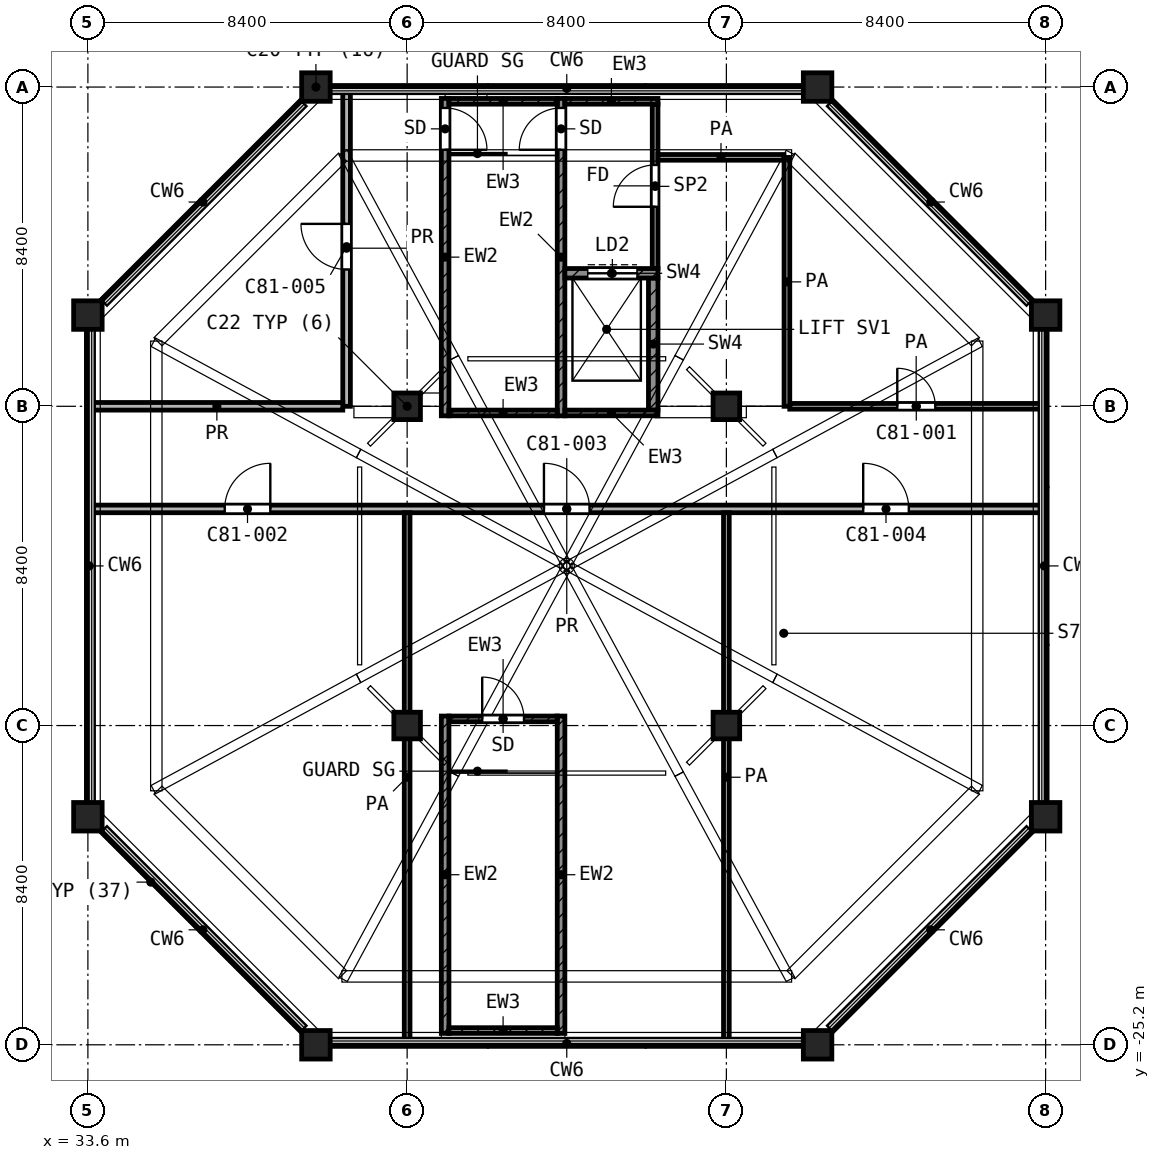
"""IFC4 building model, lengths in metres.
Left out: names, types, materials, properties, quantities, classifications, styles, units other than length and angle.
Written with IfcOpenShell. Run it as: python <this file> out.ifc"""

import sys

from ifc_helpers import new_model, si_unit, direction, frame, frame_2d, origin, origin_2d, place, context, subcontext, project, spatial, rectangle, extrude, element, fill, save


model = new_model("IFC4")
c1 = context("Model", 3, precision=1e-05, world=origin(), true_north=direction((0.0, 1.0)))
c2 = subcontext(c1, "Body", "Model", "MODEL_VIEW")
j1 = project(units=[si_unit("LENGTHUNIT", "METRE"), si_unit("PLANEANGLEUNIT", "RADIAN")], contexts=[c1])
p1 = place(None, origin())
s1 = spatial("IfcSite", under=j1, at=p1, CompositionType="ELEMENT")
p2 = place(p1, origin())
s2 = spatial("IfcBuilding", under=s1, at=p2, CompositionType="ELEMENT")
p3 = place(p2, frame((0.0, 0.0, 350.2)))
s3 = spatial("IfcBuildingStorey", under=s2, at=p3, CompositionType="ELEMENT", Elevation=350.2)
for number, where, z_axis, x_axis in (
    (1, (39.6, 0.0, 0.0), (0.0, 0.0, 1.0), (1.0, 0.0, 0.0)),
    (2, (52.8, 0.0, 0.0), (0.0, 0.0, 1.0), (1.0, 0.0, 0.0)),
    (3, (33.6, -6.0, 0.0), (0.0, 0.0, 1.0), (1.0, 0.0, 0.0)),
    (4, (58.8, -6.0, 0.0), (0.0, 0.0, 1.0), (1.0, 0.0, 0.0)),
):
    element("IfcColumn", number, at=place(p3, frame(where, z_axis=z_axis, x_axis=x_axis)), inside=s3, PredefinedType="COLUMN", context=c2, shape_type="SweptSolid", body=[
        extrude(rectangle(XDim=0.75, YDim=0.75, at=origin_2d()), origin(), (0.0, 0.0, 1.0), 4.5),
    ])
for number, where, z_axis, x_axis in (
    (5, (42.0, -8.4, 0.0), (0.0, 0.0, 1.0), (1.0, 0.0, 0.0)),
    (6, (50.4, -8.4, 0.0), (0.0, 0.0, 1.0), (1.0, 0.0, 0.0)),
    (7, (42.0, -16.8, 0.0), (0.0, 0.0, 1.0), (1.0, 0.0, 0.0)),
    (8, (50.4, -16.8, 0.0), (0.0, 0.0, 1.0), (1.0, 0.0, 0.0)),
):
    element("IfcColumn", number, at=place(p3, frame(where, z_axis=z_axis, x_axis=x_axis)), inside=s3, PredefinedType="COLUMN", context=c2, shape_type="SweptSolid", body=[
        extrude(rectangle(XDim=0.7, YDim=0.7, at=origin_2d()), origin(), (0.0, 0.0, 1.0), 4.5),
    ])
for number, where, z_axis, x_axis in (
    (9, (33.6, -19.2, 0.0), (0.0, 0.0, 1.0), (1.0, 0.0, 0.0)),
    (10, (58.8, -19.2, 0.0), (0.0, 0.0, 1.0), (1.0, 0.0, 0.0)),
    (11, (39.6, -25.2, 0.0), (0.0, 0.0, 1.0), (1.0, 0.0, 0.0)),
    (12, (52.8, -25.2, 0.0), (0.0, 0.0, 1.0), (1.0, 0.0, 0.0)),
):
    element("IfcColumn", number, at=place(p3, frame(where, z_axis=z_axis, x_axis=x_axis)), inside=s3, PredefinedType="COLUMN", context=c2, shape_type="SweptSolid", body=[
        extrude(rectangle(XDim=0.75, YDim=0.75, at=origin_2d()), origin(), (0.0, 0.0, 1.0), 4.5),
    ])
p4 = place(p3, frame((39.6, -25.075, 4.5), z_axis=(0.0, 0.0, 1.0), x_axis=(1.0, 0.0, 0.0)))
e13 = element("IfcWall", 13, at=p4, inside=s3, PredefinedType="SOLIDWALL", context=c2, shape_type="SweptSolid", body=[
    extrude(rectangle(XDim=13.2, YDim=0.25, at=frame_2d((6.6, 0.0))), origin(), (0.0, 0.0, 1.0), 1.1),
])
p5 = place(p3, frame((52.785, -25.038, 4.5), z_axis=(0.0, 0.0, 1.0), x_axis=(0.707106781187, 0.707106781187, 0.0)))
e14 = element("IfcWall", 14, at=p5, inside=s3, PredefinedType="SOLIDWALL", context=c2, shape_type="SweptSolid", body=[
    extrude(rectangle(XDim=8.278, YDim=0.25, at=frame_2d((4.139, 0.0))), origin(), (0.0, 0.0, 1.0), 1.1),
])
p6 = place(p3, frame((58.675, -19.2, 4.5), z_axis=(0.0, 0.0, 1.0), x_axis=(0.0, 1.0, 0.0)))
e15 = element("IfcWall", 15, at=p6, inside=s3, PredefinedType="SOLIDWALL", context=c2, shape_type="SweptSolid", body=[
    extrude(rectangle(XDim=13.2, YDim=0.25, at=frame_2d((6.6, 0.0))), origin(), (0.0, 0.0, 1.0), 1.1),
])
p7 = place(p3, frame((58.638, -6.015, 4.5), z_axis=(0.0, 0.0, 1.0), x_axis=(-0.707106781187, 0.707106781187, 0.0)))
e16 = element("IfcWall", 16, at=p7, inside=s3, PredefinedType="SOLIDWALL", context=c2, shape_type="SweptSolid", body=[
    extrude(rectangle(XDim=8.278, YDim=0.25, at=frame_2d((4.139, 0.0))), origin(), (0.0, 0.0, 1.0), 1.1),
])
p8 = place(p3, frame((52.8, -0.125, 4.5), z_axis=(0.0, 0.0, 1.0), x_axis=(-1.0, 0.0, 0.0)))
e17 = element("IfcWall", 17, at=p8, inside=s3, PredefinedType="SOLIDWALL", context=c2, shape_type="SweptSolid", body=[
    extrude(rectangle(XDim=13.2, YDim=0.25, at=frame_2d((6.6, 0.0))), origin(), (0.0, 0.0, 1.0), 1.1),
])
p9 = place(p3, frame((39.615, -0.162, 4.5), z_axis=(0.0, 0.0, 1.0), x_axis=(-0.707106781187, -0.707106781187, 0.0)))
e18 = element("IfcWall", 18, at=p9, inside=s3, PredefinedType="SOLIDWALL", context=c2, shape_type="SweptSolid", body=[
    extrude(rectangle(XDim=8.278, YDim=0.25, at=frame_2d((4.139, 0.0))), origin(), (0.0, 0.0, 1.0), 1.1),
])
p10 = place(p3, frame((33.725, -6.0, 4.5), z_axis=(0.0, 0.0, 1.0), x_axis=(0.0, -1.0, 0.0)))
e19 = element("IfcWall", 19, at=p10, inside=s3, PredefinedType="SOLIDWALL", context=c2, shape_type="SweptSolid", body=[
    extrude(rectangle(XDim=13.2, YDim=0.25, at=frame_2d((6.6, 0.0))), origin(), (0.0, 0.0, 1.0), 1.1),
])
p11 = place(p3, frame((33.762, -19.185, 4.5), z_axis=(0.0, 0.0, 1.0), x_axis=(0.707106781187, -0.707106781187, 0.0)))
e20 = element("IfcWall", 20, at=p11, inside=s3, PredefinedType="SOLIDWALL", context=c2, shape_type="SweptSolid", body=[
    extrude(rectangle(XDim=8.278, YDim=0.25, at=frame_2d((4.139, 0.0))), origin(), (0.0, 0.0, 1.0), 1.1),
])
p12 = place(p3, frame((43.0, -8.65, 0.0), z_axis=(0.0, 0.0, 1.0), x_axis=(0.0, 1.0, 0.0)))
e21 = element("IfcWall", 21, at=p12, inside=s3, PredefinedType="SHEAR", context=c2, shape_type="SweptSolid", body=[
    extrude(rectangle(XDim=8.35, YDim=0.2, at=frame_2d((4.175, 0.0))), origin(), (0.0, 0.0, 1.0), 4.2),
])
p13 = place(p12, frame((7.0, 0.0, 0.0)))
e22 = element("IfcOpeningElement", 22, at=p13, cuts=e21, PredefinedType="OPENING", context=c2, shape_type="SweptSolid", body=[
    extrude(rectangle(XDim=1.1, YDim=2.1, at=frame_2d((0.55, 1.05))), frame((0.0, 0.11, 0.0), z_axis=(0.0, -1.0, 0.0), x_axis=(1.0, 0.0, 0.0)), (0.0, 0.0, 1.0), 0.22),
])
p14 = place(p3, frame((46.05, -8.65, 0.0), z_axis=(0.0, 0.0, 1.0), x_axis=(0.0, 1.0, 0.0)))
e23 = element("IfcWall", 23, at=p14, inside=s3, PredefinedType="SHEAR", context=c2, shape_type="SweptSolid", body=[
    extrude(rectangle(XDim=8.35, YDim=0.2, at=frame_2d((4.175, 0.0))), origin(), (0.0, 0.0, 1.0), 4.2),
])
p15 = place(p14, frame((7.0, 0.0, 0.0)))
e24 = element("IfcOpeningElement", 24, at=p15, cuts=e23, PredefinedType="OPENING", context=c2, shape_type="SweptSolid", body=[
    extrude(rectangle(XDim=1.1, YDim=2.1, at=frame_2d((0.55, 1.05))), frame((0.0, 0.11, 0.0), z_axis=(0.0, -1.0, 0.0), x_axis=(1.0, 0.0, 0.0)), (0.0, 0.0, 1.0), 0.22),
])
p16 = place(p3, frame((43.1, -0.375, 0.0), z_axis=(0.0, 0.0, 1.0), x_axis=(1.0, 0.0, 0.0)))
e25 = element("IfcWall", 25, at=p16, inside=s3, PredefinedType="SHEAR", context=c2, shape_type="SweptSolid", body=[
    extrude(rectangle(XDim=2.85, YDim=0.15, at=frame_2d((1.425, 0.0))), origin(), (0.0, 0.0, 1.0), 4.2),
])
p17 = place(p3, frame((46.15, -0.375, 0.0), z_axis=(0.0, 0.0, 1.0), x_axis=(1.0, 0.0, 0.0)))
e26 = element("IfcWall", 26, at=p17, inside=s3, PredefinedType="SHEAR", context=c2, shape_type="SweptSolid", body=[
    extrude(rectangle(XDim=2.45, YDim=0.15, at=frame_2d((1.225, 0.0))), origin(), (0.0, 0.0, 1.0), 4.2),
])
p18 = place(p3, frame((43.1, -8.575, 0.0), z_axis=(0.0, 0.0, 1.0), x_axis=(1.0, 0.0, 0.0)))
e27 = element("IfcWall", 27, at=p18, inside=s3, PredefinedType="SHEAR", context=c2, shape_type="SweptSolid", body=[
    extrude(rectangle(XDim=2.85, YDim=0.15, at=frame_2d((1.425, 0.0))), origin(), (0.0, 0.0, 1.0), 4.2),
])
p19 = place(p3, frame((46.15, -8.575, 0.0), z_axis=(0.0, 0.0, 1.0), x_axis=(1.0, 0.0, 0.0)))
e28 = element("IfcWall", 28, at=p19, inside=s3, PredefinedType="SHEAR", context=c2, shape_type="SweptSolid", body=[
    extrude(rectangle(XDim=2.45, YDim=0.15, at=frame_2d((1.225, 0.0))), origin(), (0.0, 0.0, 1.0), 4.2),
])
p20 = place(p3, frame((46.15, -4.9, 0.0), z_axis=(0.0, 0.0, 1.0), x_axis=(1.0, 0.0, 0.0)))
e29 = element("IfcWall", 29, at=p20, inside=s3, PredefinedType="SHEAR", context=c2, shape_type="SweptSolid", body=[
    extrude(rectangle(XDim=2.45, YDim=0.25, at=frame_2d((1.225, 0.0))), origin(), (0.0, 0.0, 1.0), 4.2),
])
p21 = place(p20, frame((0.6, 0.0, 0.0)))
e30 = element("IfcOpeningElement", 30, at=p21, cuts=e29, PredefinedType="OPENING", context=c2, shape_type="SweptSolid", body=[
    extrude(rectangle(XDim=1.3, YDim=2.1, at=frame_2d((0.65, 1.05))), frame((0.0, 0.135, 0.0), z_axis=(0.0, -1.0, 0.0), x_axis=(1.0, 0.0, 0.0)), (0.0, 0.0, 1.0), 0.27),
])
p22 = place(p3, frame((48.475, -8.5, 0.0), z_axis=(0.0, 0.0, 1.0), x_axis=(0.0, 1.0, 0.0)))
e31 = element("IfcWall", 31, at=p22, inside=s3, PredefinedType="SHEAR", context=c2, shape_type="SweptSolid", body=[
    extrude(rectangle(XDim=3.475, YDim=0.25, at=frame_2d((1.738, 0.0))), origin(), (0.0, 0.0, 1.0), 4.2),
])
p23 = place(p3, frame((48.525, -4.775, 0.0), z_axis=(0.0, 0.0, 1.0), x_axis=(0.0, 1.0, 0.0)))
e32 = element("IfcWall", 32, at=p23, inside=s3, PredefinedType="PARTITIONING", context=c2, shape_type="SweptSolid", body=[
    extrude(rectangle(XDim=4.325, YDim=0.15, at=frame_2d((2.163, 0.0))), origin(), (0.0, 0.0, 1.0), 4.2),
])
p24 = place(p23, frame((1.625, 0.0, 0.0)))
e33 = element("IfcOpeningElement", 33, at=p24, cuts=e32, PredefinedType="OPENING", context=c2, shape_type="SweptSolid", body=[
    extrude(rectangle(XDim=1.1, YDim=2.1, at=frame_2d((0.55, 1.05))), frame((0.0, 0.085, 0.0), z_axis=(0.0, -1.0, 0.0), x_axis=(1.0, 0.0, 0.0)), (0.0, 0.0, 1.0), 0.17),
])
for number, where, z_axis, x_axis in (
    (34, (43.0, -24.9, 0.0), (0.0, 0.0, 1.0), (0.0, 1.0, 0.0)),
    (35, (46.05, -24.9, 0.0), (0.0, 0.0, 1.0), (0.0, 1.0, 0.0)),
):
    element("IfcWall", number, at=place(p3, frame(where, z_axis=z_axis, x_axis=x_axis)), inside=s3, PredefinedType="SHEAR", context=c2, shape_type="SweptSolid", body=[
        extrude(rectangle(XDim=8.35, YDim=0.2, at=frame_2d((4.175, 0.0))), origin(), (0.0, 0.0, 1.0), 4.2),
    ])
p25 = place(p3, frame((43.1, -16.625, 0.0), z_axis=(0.0, 0.0, 1.0), x_axis=(1.0, 0.0, 0.0)))
e36 = element("IfcWall", 36, at=p25, inside=s3, PredefinedType="SHEAR", context=c2, shape_type="SweptSolid", body=[
    extrude(rectangle(XDim=2.85, YDim=0.15, at=frame_2d((1.425, 0.0))), origin(), (0.0, 0.0, 1.0), 4.2),
])
p26 = place(p25, frame((0.875, 0.0, 0.0)))
e37 = element("IfcOpeningElement", 37, at=p26, cuts=e36, PredefinedType="OPENING", context=c2, shape_type="SweptSolid", body=[
    extrude(rectangle(XDim=1.1, YDim=2.1, at=frame_2d((0.55, 1.05))), frame((0.0, 0.085, 0.0), z_axis=(0.0, -1.0, 0.0), x_axis=(1.0, 0.0, 0.0)), (0.0, 0.0, 1.0), 0.17),
])
p27 = place(p3, frame((43.1, -24.825, 0.0), z_axis=(0.0, 0.0, 1.0), x_axis=(1.0, 0.0, 0.0)))
e38 = element("IfcWall", 38, at=p27, inside=s3, PredefinedType="SHEAR", context=c2, shape_type="SweptSolid", body=[
    extrude(rectangle(XDim=2.85, YDim=0.15, at=frame_2d((1.425, 0.0))), origin(), (0.0, 0.0, 1.0), 4.2),
])
p28 = place(p3, frame((52.068, -8.4, 0.0), z_axis=(0.0, 0.0, 1.0), x_axis=(1.0, 0.0, 0.0)))
e39 = element("IfcWall", 39, at=p28, inside=s3, PredefinedType="PARTITIONING", context=c2, shape_type="SweptSolid", body=[
    extrude(rectangle(XDim=6.652, YDim=0.15, at=frame_2d((3.326, 0.0))), origin(), (0.0, 0.0, 1.0), 4.2),
])
p29 = place(p28, frame((2.829, 0.0, 0.0)))
e40 = element("IfcOpeningElement", 40, at=p29, cuts=e39, PredefinedType="OPENING", context=c2, shape_type="SweptSolid", body=[
    extrude(rectangle(XDim=1.0, YDim=2.1, at=frame_2d((0.5, 1.05))), frame((0.0, 0.085, 0.0), z_axis=(0.0, -1.0, 0.0), x_axis=(1.0, 0.0, 0.0)), (0.0, 0.0, 1.0), 0.17),
])
p30 = place(p3, frame((48.6, -1.85, 0.0), z_axis=(0.0, 0.0, 1.0), x_axis=(1.0, 0.0, 0.0)))
e41 = element("IfcWall", 41, at=p30, inside=s3, PredefinedType="PARTITIONING", context=c2, shape_type="SweptSolid", body=[
    extrude(rectangle(XDim=3.316, YDim=0.15, at=frame_2d((1.658, 0.0))), origin(), (0.0, 0.0, 1.0), 4.2),
])
for number, where, z_axis, x_axis in (
    (42, (42.0, -25.12, 0.0), (0.0, 0.0, 1.0), (0.0, 1.0, 0.0)),
    (43, (50.4, -25.12, 0.0), (0.0, 0.0, 1.0), (0.0, 1.0, 0.0)),
):
    element("IfcWall", number, at=place(p3, frame(where, z_axis=z_axis, x_axis=x_axis)), inside=s3, PredefinedType="PARTITIONING", context=c2, shape_type="SweptSolid", body=[
        extrude(rectangle(XDim=13.92, YDim=0.15, at=frame_2d((6.96, 0.0))), origin(), (0.0, 0.0, 1.0), 4.2),
    ])
p31 = place(p3, frame((51.993, -8.4, 0.0), z_axis=(0.0, 0.0, 1.0), x_axis=(0.0, 1.0, 0.0)))
e44 = element("IfcWall", 44, at=p31, inside=s3, PredefinedType="PARTITIONING", context=c2, shape_type="SweptSolid", body=[
    extrude(rectangle(XDim=6.548, YDim=0.15, at=frame_2d((3.274, 0.0))), origin(), (0.0, 0.0, 1.0), 4.2),
])
p32 = place(p3, frame((33.68, -11.1, 0.0), z_axis=(0.0, 0.0, 1.0), x_axis=(1.0, 0.0, 0.0)))
e45 = element("IfcWall", 45, at=p32, inside=s3, PredefinedType="PARTITIONING", context=c2, shape_type="SweptSolid", body=[
    extrude(rectangle(XDim=25.04, YDim=0.2, at=frame_2d((12.52, 0.0))), origin(), (0.0, 0.0, 1.0), 4.2),
])
p33 = place(p32, frame((3.52, 0.0, 0.0)))
e46 = element("IfcOpeningElement", 46, at=p33, cuts=e45, PredefinedType="OPENING", context=c2, shape_type="SweptSolid", body=[
    extrude(rectangle(XDim=1.2, YDim=2.1, at=frame_2d((0.6, 1.05))), frame((0.0, 0.11, 0.0), z_axis=(0.0, -1.0, 0.0), x_axis=(1.0, 0.0, 0.0)), (0.0, 0.0, 1.0), 0.22),
])
p34 = place(p32, frame((11.92, 0.0, 0.0)))
e47 = element("IfcOpeningElement", 47, at=p34, cuts=e45, PredefinedType="OPENING", context=c2, shape_type="SweptSolid", body=[
    extrude(rectangle(XDim=1.2, YDim=2.1, at=frame_2d((0.6, 1.05))), frame((0.0, 0.11, 0.0), z_axis=(0.0, -1.0, 0.0), x_axis=(1.0, 0.0, 0.0)), (0.0, 0.0, 1.0), 0.22),
])
p35 = place(p32, frame((20.32, 0.0, 0.0)))
e48 = element("IfcOpeningElement", 48, at=p35, cuts=e45, PredefinedType="OPENING", context=c2, shape_type="SweptSolid", body=[
    extrude(rectangle(XDim=1.2, YDim=2.1, at=frame_2d((0.6, 1.05))), frame((0.0, 0.11, 0.0), z_axis=(0.0, -1.0, 0.0), x_axis=(1.0, 0.0, 0.0)), (0.0, 0.0, 1.0), 0.22),
])
p36 = place(p3, frame((33.68, -8.4, 0.0), z_axis=(0.0, 0.0, 1.0), x_axis=(1.0, 0.0, 0.0)))
e49 = element("IfcWall", 49, at=p36, inside=s3, PredefinedType="PARTITIONING", context=c2, shape_type="SweptSolid", body=[
    extrude(rectangle(XDim=6.627, YDim=0.2, at=frame_2d((3.313, 0.0))), origin(), (0.0, 0.0, 1.0), 4.2),
])
p37 = place(p3, frame((40.407, -8.4, 0.0), z_axis=(0.0, 0.0, 1.0), x_axis=(0.0, 1.0, 0.0)))
e50 = element("IfcWall", 50, at=p37, inside=s3, PredefinedType="PARTITIONING", context=c2, shape_type="SweptSolid", body=[
    extrude(rectangle(XDim=8.32, YDim=0.2, at=frame_2d((4.16, 0.0))), origin(), (0.0, 0.0, 1.0), 4.2),
])
p38 = place(p37, frame((3.6, 0.0, 0.0)))
e51 = element("IfcOpeningElement", 51, at=p38, cuts=e50, PredefinedType="OPENING", context=c2, shape_type="SweptSolid", body=[
    extrude(rectangle(XDim=1.2, YDim=2.1, at=frame_2d((0.6, 1.05))), frame((0.0, 0.11, 0.0), z_axis=(0.0, -1.0, 0.0), x_axis=(1.0, 0.0, 0.0)), (0.0, 0.0, 1.0), 0.22),
])
p39 = place(p13, frame((1.1, 0.0, 0.0), z_axis=(0.0, 0.0, 1.0), x_axis=(-1.0, 0.0, 0.0)))
e52 = element("IfcDoor", 52, at=p39, inside=s3, OperationType="SINGLE_SWING_LEFT", PredefinedType="DOOR", context=c2, shape_type="SweptSolid", body=[
    extrude(rectangle(XDim=1.1, YDim=2.1, at=frame_2d((0.55, 1.05))), frame((0.0, 0.025, 0.0), z_axis=(0.0, -1.0, 0.0), x_axis=(1.0, 0.0, 0.0)), (0.0, 0.0, 1.0), 0.05),
])
fill(e22, e52)
p40 = place(p15, origin())
e53 = element("IfcDoor", 53, at=p40, inside=s3, OperationType="SINGLE_SWING_LEFT", PredefinedType="DOOR", context=c2, shape_type="SweptSolid", body=[
    extrude(rectangle(XDim=1.1, YDim=2.1, at=frame_2d((0.55, 1.05))), frame((0.0, 0.025, 0.0), z_axis=(0.0, -1.0, 0.0), x_axis=(1.0, 0.0, 0.0)), (0.0, 0.0, 1.0), 0.05),
])
fill(e24, e53)
p41 = place(p21, origin())
e54 = element("IfcDoor", 54, at=p41, inside=s3, OperationType="DOUBLE_DOOR_SLIDING", PredefinedType="DOOR", context=c2, shape_type="SweptSolid", body=[
    extrude(rectangle(XDim=1.3, YDim=2.1, at=frame_2d((0.65, 1.05))), frame((0.0, 0.025, 0.0), z_axis=(0.0, -1.0, 0.0), x_axis=(1.0, 0.0, 0.0)), (0.0, 0.0, 1.0), 0.05),
])
fill(e30, e54)
p42 = place(p24, origin())
e55 = element("IfcDoor", 55, at=p42, inside=s3, OperationType="SINGLE_SWING_LEFT", PredefinedType="DOOR", context=c2, shape_type="SweptSolid", body=[
    extrude(rectangle(XDim=1.1, YDim=2.1, at=frame_2d((0.55, 1.05))), frame((0.0, 0.025, 0.0), z_axis=(0.0, -1.0, 0.0), x_axis=(1.0, 0.0, 0.0)), (0.0, 0.0, 1.0), 0.05),
])
fill(e33, e55)
p43 = place(p26, origin())
e56 = element("IfcDoor", 56, at=p43, inside=s3, OperationType="SINGLE_SWING_LEFT", PredefinedType="DOOR", context=c2, shape_type="SweptSolid", body=[
    extrude(rectangle(XDim=1.1, YDim=2.1, at=frame_2d((0.55, 1.05))), frame((0.0, 0.025, 0.0), z_axis=(0.0, -1.0, 0.0), x_axis=(1.0, 0.0, 0.0)), (0.0, 0.0, 1.0), 0.05),
])
fill(e37, e56)
p44 = place(p33, origin())
e57 = element("IfcDoor", 57, at=p44, inside=s3, OperationType="SINGLE_SWING_RIGHT", PredefinedType="DOOR", context=c2, shape_type="SweptSolid", body=[
    extrude(rectangle(XDim=1.2, YDim=2.1, at=frame_2d((0.6, 1.05))), frame((0.0, 0.025, 0.0), z_axis=(0.0, -1.0, 0.0), x_axis=(1.0, 0.0, 0.0)), (0.0, 0.0, 1.0), 0.05),
])
fill(e46, e57)
p45 = place(p34, origin())
e58 = element("IfcDoor", 58, at=p45, inside=s3, OperationType="SINGLE_SWING_LEFT", PredefinedType="DOOR", context=c2, shape_type="SweptSolid", body=[
    extrude(rectangle(XDim=1.2, YDim=2.1, at=frame_2d((0.6, 1.05))), frame((0.0, 0.025, 0.0), z_axis=(0.0, -1.0, 0.0), x_axis=(1.0, 0.0, 0.0)), (0.0, 0.0, 1.0), 0.05),
])
fill(e47, e58)
p46 = place(p35, origin())
e59 = element("IfcDoor", 59, at=p46, inside=s3, OperationType="SINGLE_SWING_LEFT", PredefinedType="DOOR", context=c2, shape_type="SweptSolid", body=[
    extrude(rectangle(XDim=1.2, YDim=2.1, at=frame_2d((0.6, 1.05))), frame((0.0, 0.025, 0.0), z_axis=(0.0, -1.0, 0.0), x_axis=(1.0, 0.0, 0.0)), (0.0, 0.0, 1.0), 0.05),
])
fill(e48, e59)
p47 = place(p38, origin())
e60 = element("IfcDoor", 60, at=p47, inside=s3, OperationType="SINGLE_SWING_RIGHT", PredefinedType="DOOR", context=c2, shape_type="SweptSolid", body=[
    extrude(rectangle(XDim=1.2, YDim=2.1, at=frame_2d((0.6, 1.05))), frame((0.0, 0.025, 0.0), z_axis=(0.0, -1.0, 0.0), x_axis=(1.0, 0.0, 0.0)), (0.0, 0.0, 1.0), 0.05),
])
fill(e51, e60)
p48 = place(p29, origin())
e61 = element("IfcDoor", 61, at=p48, inside=s3, OperationType="SINGLE_SWING_LEFT", PredefinedType="DOOR", context=c2, shape_type="SweptSolid", body=[
    extrude(rectangle(XDim=1.0, YDim=2.1, at=frame_2d((0.5, 1.05))), frame((0.0, 0.025, 0.0), z_axis=(0.0, -1.0, 0.0), x_axis=(1.0, 0.0, 0.0)), (0.0, 0.0, 1.0), 0.05),
])
fill(e40, e61)
save(model, sys.argv[1])
